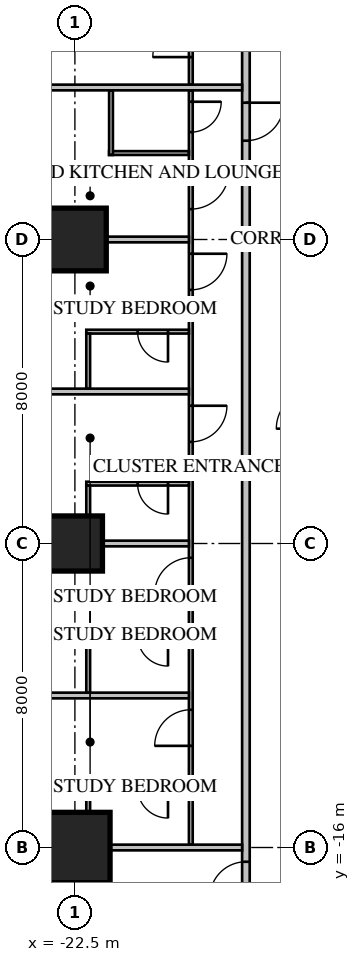
"""IFC4 building model, lengths in metres.
Left out: names, types, materials, properties, quantities, classifications, styles, units other than length and angle.
Written with IfcOpenShell. Run it as: python <this file> out.ifc"""

import sys

from ifc_helpers import new_model, si_unit, direction, frame, frame_2d, origin, origin_2d, place, context, subcontext, project, spatial, rectangle, extrude, element, fill, save


model = new_model("IFC4")
c1 = context("Model", 3, precision=1e-05, world=origin(), true_north=direction((0.0, 1.0)))
c2 = subcontext(c1, "Body", "Model", "MODEL_VIEW")
j1 = project(units=[si_unit("LENGTHUNIT", "METRE"), si_unit("PLANEANGLEUNIT", "RADIAN")], contexts=[c1])
p1 = place(None, origin())
s1 = spatial("IfcSite", under=j1, at=p1, CompositionType="ELEMENT")
p2 = place(p1, origin())
s2 = spatial("IfcBuilding", under=s1, at=p2, CompositionType="ELEMENT")
p3 = place(p2, frame((0.0, 0.0, 27.55)))
s3 = spatial("IfcBuildingStorey", under=s2, at=p3, CompositionType="ELEMENT", Elevation=27.55)
p4 = place(p3, frame((-22.5, 0.0, 0.0), z_axis=(0.0, 0.0, 1.0), x_axis=(1.0, 0.0, 0.0)))
e1 = element("IfcColumn", 1, at=p4, inside=s3, PredefinedType="COLUMN", context=c2, shape_type="SweptSolid", body=[
    extrude(rectangle(XDim=1.65, YDim=1.65, at=origin_2d()), origin(), (0.0, 0.0, 1.0), 3.85),
])
p5 = place(p3, frame((-22.5, -8.0, 0.0), z_axis=(0.0, 0.0, 1.0), x_axis=(1.0, 0.0, 0.0)))
e2 = element("IfcColumn", 2, at=p5, inside=s3, PredefinedType="COLUMN", context=c2, shape_type="SweptSolid", body=[
    extrude(rectangle(XDim=1.45, YDim=1.45, at=origin_2d()), origin(), (0.0, 0.0, 1.0), 3.85),
])
p6 = place(p3, frame((-22.5, -16.0, 0.0), z_axis=(0.0, 0.0, 1.0), x_axis=(1.0, 0.0, 0.0)))
e3 = element("IfcColumn", 3, at=p6, inside=s3, PredefinedType="COLUMN", context=c2, shape_type="SweptSolid", body=[
    extrude(rectangle(XDim=1.85, YDim=1.85, at=origin_2d()), origin(), (0.0, 0.0, 1.0), 3.85),
])
p7 = place(p3, frame((-18.0, 18.0, 0.0), z_axis=(0.0, 0.0, 1.0), x_axis=(0.0, -1.0, 0.0)))
e4 = element("IfcWall", 4, at=p7, inside=s3, PredefinedType="PARTITIONING", context=c2, shape_type="SweptSolid", body=[
    extrude(rectangle(XDim=36.0, YDim=0.2, at=frame_2d((18.0, 0.0))), origin(), (0.0, 0.0, 1.0), 3.65),
])
p8 = place(p7, frame((10.4, 0.0, 0.0)))
e5 = element("IfcOpeningElement", 5, at=p8, cuts=e4, PredefinedType="OPENING", context=c2, shape_type="SweptSolid", body=[
    extrude(rectangle(XDim=1.0, YDim=2.1, at=frame_2d((0.5, 1.05))), frame((0.0, 0.12, 0.0), z_axis=(0.0, -1.0, 0.0), x_axis=(1.0, 0.0, 0.0)), (0.0, 0.0, 1.0), 0.24),
])
p9 = place(p7, frame((14.4, 0.0, 0.0)))
e6 = element("IfcOpeningElement", 6, at=p9, cuts=e4, PredefinedType="OPENING", context=c2, shape_type="SweptSolid", body=[
    extrude(rectangle(XDim=1.0, YDim=2.1, at=frame_2d((0.5, 1.05))), frame((0.0, 0.12, 0.0), z_axis=(0.0, -1.0, 0.0), x_axis=(1.0, 0.0, 0.0)), (0.0, 0.0, 1.0), 0.24),
])
p10 = place(p7, frame((0.375, 0.0, 0.0)))
e7 = element("IfcOpeningElement", 7, at=p10, cuts=e4, PredefinedType="OPENING", context=c2, shape_type="SweptSolid", body=[
    extrude(rectangle(XDim=1.0, YDim=2.1, at=frame_2d((0.5, 1.05))), frame((0.0, 0.12, 0.0), z_axis=(0.0, -1.0, 0.0), x_axis=(1.0, 0.0, 0.0)), (0.0, 0.0, 1.0), 0.24),
])
p11 = place(p7, frame((34.375, 0.0, 0.0)))
e8 = element("IfcOpeningElement", 8, at=p11, cuts=e4, PredefinedType="OPENING", context=c2, shape_type="SweptSolid", body=[
    extrude(rectangle(XDim=0.95, YDim=2.1, at=frame_2d((0.475, 1.05))), frame((0.0, 0.12, 0.0), z_axis=(0.0, -1.0, 0.0), x_axis=(1.0, 0.0, 0.0)), (0.0, 0.0, 1.0), 0.24),
])
p12 = place(p3, frame((-19.45, 15.925, 0.0), z_axis=(0.0, 0.0, 1.0), x_axis=(0.0, -1.0, 0.0)))
e9 = element("IfcWall", 9, at=p12, inside=s3, PredefinedType="PARTITIONING", context=c2, shape_type="SweptSolid", body=[
    extrude(rectangle(XDim=11.85, YDim=0.1, at=frame_2d((5.925, 0.0))), origin(), (0.0, 0.0, 1.0), 3.65),
])
p13 = place(p12, frame((10.125, 0.0, 0.0)))
e10 = element("IfcOpeningElement", 10, at=p13, cuts=e9, PredefinedType="OPENING", context=c2, shape_type="SweptSolid", body=[
    extrude(rectangle(XDim=1.0, YDim=2.1, at=frame_2d((0.5, 1.05))), frame((0.0, 0.07, 0.0), z_axis=(0.0, -1.0, 0.0), x_axis=(1.0, 0.0, 0.0)), (0.0, 0.0, 1.0), 0.14),
])
p14 = place(p12, frame((8.3, 0.0, 0.0)))
e11 = element("IfcOpeningElement", 11, at=p14, cuts=e9, PredefinedType="OPENING", context=c2, shape_type="SweptSolid", body=[
    extrude(rectangle(XDim=0.8, YDim=2.1, at=frame_2d((0.4, 1.05))), frame((0.0, 0.07, 0.0), z_axis=(0.0, -1.0, 0.0), x_axis=(1.0, 0.0, 0.0)), (0.0, 0.0, 1.0), 0.14),
])
p15 = place(p12, frame((0.3, 0.0, 0.0)))
e12 = element("IfcOpeningElement", 12, at=p15, cuts=e9, PredefinedType="OPENING", context=c2, shape_type="SweptSolid", body=[
    extrude(rectangle(XDim=0.95, YDim=2.1, at=frame_2d((0.475, 1.05))), frame((0.0, 0.07, 0.0), z_axis=(0.0, -1.0, 0.0), x_axis=(1.0, 0.0, 0.0)), (0.0, 0.0, 1.0), 0.14),
])
p16 = place(p12, frame((4.3, 0.0, 0.0)))
e13 = element("IfcOpeningElement", 13, at=p16, cuts=e9, PredefinedType="OPENING", context=c2, shape_type="SweptSolid", body=[
    extrude(rectangle(XDim=0.95, YDim=2.1, at=frame_2d((0.475, 1.05))), frame((0.0, 0.07, 0.0), z_axis=(0.0, -1.0, 0.0), x_axis=(1.0, 0.0, 0.0)), (0.0, 0.0, 1.0), 0.14),
])
p17 = place(p3, frame((-19.45, 3.925, 0.0), z_axis=(0.0, 0.0, 1.0), x_axis=(0.0, -1.0, 0.0)))
e14 = element("IfcWall", 14, at=p17, inside=s3, PredefinedType="PARTITIONING", context=c2, shape_type="SweptSolid", body=[
    extrude(rectangle(XDim=19.85, YDim=0.1, at=frame_2d((9.925, 0.0))), origin(), (0.0, 0.0, 1.0), 3.65),
])
p18 = place(p17, frame((2.125, 0.0, 0.0)))
e15 = element("IfcOpeningElement", 15, at=p18, cuts=e14, PredefinedType="OPENING", context=c2, shape_type="SweptSolid", body=[
    extrude(rectangle(XDim=1.0, YDim=2.1, at=frame_2d((0.5, 1.05))), frame((0.0, 0.07, 0.0), z_axis=(0.0, -1.0, 0.0), x_axis=(1.0, 0.0, 0.0)), (0.0, 0.0, 1.0), 0.14),
])
p19 = place(p17, frame((0.3, 0.0, 0.0)))
e16 = element("IfcOpeningElement", 16, at=p19, cuts=e14, PredefinedType="OPENING", context=c2, shape_type="SweptSolid", body=[
    extrude(rectangle(XDim=0.8, YDim=2.1, at=frame_2d((0.4, 1.05))), frame((0.0, 0.07, 0.0), z_axis=(0.0, -1.0, 0.0), x_axis=(1.0, 0.0, 0.0)), (0.0, 0.0, 1.0), 0.14),
])
p20 = place(p17, frame((4.3, 0.0, 0.0)))
e17 = element("IfcOpeningElement", 17, at=p20, cuts=e14, PredefinedType="OPENING", context=c2, shape_type="SweptSolid", body=[
    extrude(rectangle(XDim=0.95, YDim=2.1, at=frame_2d((0.475, 1.05))), frame((0.0, 0.07, 0.0), z_axis=(0.0, -1.0, 0.0), x_axis=(1.0, 0.0, 0.0)), (0.0, 0.0, 1.0), 0.14),
])
p21 = place(p17, frame((8.3, 0.0, 0.0)))
e18 = element("IfcOpeningElement", 18, at=p21, cuts=e14, PredefinedType="OPENING", context=c2, shape_type="SweptSolid", body=[
    extrude(rectangle(XDim=0.95, YDim=2.1, at=frame_2d((0.475, 1.05))), frame((0.0, 0.07, 0.0), z_axis=(0.0, -1.0, 0.0), x_axis=(1.0, 0.0, 0.0)), (0.0, 0.0, 1.0), 0.14),
])
p22 = place(p17, frame((12.3, 0.0, 0.0)))
e19 = element("IfcOpeningElement", 19, at=p22, cuts=e14, PredefinedType="OPENING", context=c2, shape_type="SweptSolid", body=[
    extrude(rectangle(XDim=0.95, YDim=2.1, at=frame_2d((0.475, 1.05))), frame((0.0, 0.07, 0.0), z_axis=(0.0, -1.0, 0.0), x_axis=(1.0, 0.0, 0.0)), (0.0, 0.0, 1.0), 0.14),
])
p23 = place(p17, frame((16.3, 0.0, 0.0)))
e20 = element("IfcOpeningElement", 20, at=p23, cuts=e14, PredefinedType="OPENING", context=c2, shape_type="SweptSolid", body=[
    extrude(rectangle(XDim=0.95, YDim=2.1, at=frame_2d((0.475, 1.05))), frame((0.0, 0.07, 0.0), z_axis=(0.0, -1.0, 0.0), x_axis=(1.0, 0.0, 0.0)), (0.0, 0.0, 1.0), 0.14),
])
p24 = place(p3, frame((-19.5, 2.275, 0.0), z_axis=(0.0, 0.0, 1.0), x_axis=(-1.0, 0.0, 0.0)))
e21 = element("IfcWall", 21, at=p24, inside=s3, PredefinedType="PARTITIONING", context=c2, shape_type="SweptSolid", body=[
    extrude(rectangle(XDim=2.1, YDim=0.1, at=frame_2d((1.05, 0.0))), origin(), (0.0, 0.0, 1.0), 3.65),
])
p25 = place(p3, frame((-21.55, 3.925, 0.0), z_axis=(0.0, 0.0, 1.0), x_axis=(0.0, -1.0, 0.0)))
e22 = element("IfcWall", 22, at=p25, inside=s3, PredefinedType="PARTITIONING", context=c2, shape_type="SweptSolid", body=[
    extrude(rectangle(XDim=1.7, YDim=0.1, at=frame_2d((0.85, 0.0))), origin(), (0.0, 0.0, 1.0), 3.65),
])
p26 = place(p3, frame((-18.1, 4.0, 0.0), z_axis=(0.0, 0.0, 1.0), x_axis=(-1.0, 0.0, 0.0)))
e23 = element("IfcWall", 23, at=p26, inside=s3, PredefinedType="PARTITIONING", context=c2, shape_type="SweptSolid", body=[
    extrude(rectangle(XDim=6.6, YDim=0.15, at=frame_2d((3.3, 0.0))), origin(), (0.0, 0.0, 1.0), 3.65),
])
p27 = place(p3, frame((-19.5, 0.0, 0.0), z_axis=(0.0, 0.0, 1.0), x_axis=(-1.0, 0.0, 0.0)))
e24 = element("IfcWall", 24, at=p27, inside=s3, PredefinedType="PARTITIONING", context=c2, shape_type="SweptSolid", body=[
    extrude(rectangle(XDim=5.2, YDim=0.15, at=frame_2d((2.6, 0.0))), origin(), (0.0, 0.0, 1.0), 2.957),
])
for number, where, z_axis, x_axis in (
    (25, (-19.5, -4.0, 0.0), (0.0, 0.0, 1.0), (-1.0, 0.0, 0.0)),
    (26, (-19.5, -8.0, 0.0), (0.0, 0.0, 1.0), (-1.0, 0.0, 0.0)),
    (27, (-19.5, -12.0, 0.0), (0.0, 0.0, 1.0), (-1.0, 0.0, 0.0)),
):
    element("IfcWall", number, at=place(p3, frame(where, z_axis=z_axis, x_axis=x_axis)), inside=s3, PredefinedType="PARTITIONING", context=c2, shape_type="SweptSolid", body=[
        extrude(rectangle(XDim=5.2, YDim=0.15, at=frame_2d((2.6, 0.0))), origin(), (0.0, 0.0, 1.0), 3.65),
    ])
p28 = place(p3, frame((-18.1, -16.0, 0.0), z_axis=(0.0, 0.0, 1.0), x_axis=(-1.0, 0.0, 0.0)))
e28 = element("IfcWall", 28, at=p28, inside=s3, PredefinedType="PARTITIONING", context=c2, shape_type="SweptSolid", body=[
    extrude(rectangle(XDim=6.589, YDim=0.15, at=frame_2d((3.295, 0.0))), origin(), (0.0, 0.0, 1.0), 3.65),
])
p29 = place(p3, frame((-19.5, -2.425, 0.0), z_axis=(0.0, 0.0, 1.0), x_axis=(-1.0, 0.0, 0.0)))
e29 = element("IfcWall", 29, at=p29, inside=s3, PredefinedType="PARTITIONING", context=c2, shape_type="SweptSolid", body=[
    extrude(rectangle(XDim=2.7, YDim=0.1, at=frame_2d((1.35, 0.0))), origin(), (0.0, 0.0, 1.0), 3.65),
])
p30 = place(p29, frame((0.55, 0.0, 0.0)))
e30 = element("IfcOpeningElement", 30, at=p30, cuts=e29, PredefinedType="OPENING", context=c2, shape_type="SweptSolid", body=[
    extrude(rectangle(XDim=0.8, YDim=2.1, at=frame_2d((0.4, 1.05))), frame((0.0, 0.07, 0.0), z_axis=(0.0, -1.0, 0.0), x_axis=(1.0, 0.0, 0.0)), (0.0, 0.0, 1.0), 0.14),
])
p31 = place(p3, frame((-22.15, -2.475, 0.0), z_axis=(0.0, 0.0, 1.0), x_axis=(0.0, -1.0, 0.0)))
e31 = element("IfcWall", 31, at=p31, inside=s3, PredefinedType="PARTITIONING", context=c2, shape_type="SweptSolid", body=[
    extrude(rectangle(XDim=1.45, YDim=0.1, at=frame_2d((0.725, 0.0))), origin(), (0.0, 0.0, 1.0), 3.65),
])
p32 = place(p3, frame((-19.5, -6.425, 0.0), z_axis=(0.0, 0.0, 1.0), x_axis=(-1.0, 0.0, 0.0)))
e32 = element("IfcWall", 32, at=p32, inside=s3, PredefinedType="PARTITIONING", context=c2, shape_type="SweptSolid", body=[
    extrude(rectangle(XDim=2.7, YDim=0.1, at=frame_2d((1.35, 0.0))), origin(), (0.0, 0.0, 1.0), 3.65),
])
p33 = place(p32, frame((0.55, 0.0, 0.0)))
e33 = element("IfcOpeningElement", 33, at=p33, cuts=e32, PredefinedType="OPENING", context=c2, shape_type="SweptSolid", body=[
    extrude(rectangle(XDim=0.8, YDim=2.1, at=frame_2d((0.4, 1.05))), frame((0.0, 0.07, 0.0), z_axis=(0.0, -1.0, 0.0), x_axis=(1.0, 0.0, 0.0)), (0.0, 0.0, 1.0), 0.14),
])
p34 = place(p3, frame((-22.15, -6.475, 0.0), z_axis=(0.0, 0.0, 1.0), x_axis=(0.0, -1.0, 0.0)))
e34 = element("IfcWall", 34, at=p34, inside=s3, PredefinedType="PARTITIONING", context=c2, shape_type="SweptSolid", body=[
    extrude(rectangle(XDim=1.45, YDim=0.1, at=frame_2d((0.725, 0.0))), origin(), (0.0, 0.0, 1.0), 3.65),
])
p35 = place(p3, frame((-19.5, -10.425, 0.0), z_axis=(0.0, 0.0, 1.0), x_axis=(-1.0, 0.0, 0.0)))
e35 = element("IfcWall", 35, at=p35, inside=s3, PredefinedType="PARTITIONING", context=c2, shape_type="SweptSolid", body=[
    extrude(rectangle(XDim=2.7, YDim=0.1, at=frame_2d((1.35, 0.0))), origin(), (0.0, 0.0, 1.0), 3.65),
])
p36 = place(p35, frame((0.55, 0.0, 0.0)))
e36 = element("IfcOpeningElement", 36, at=p36, cuts=e35, PredefinedType="OPENING", context=c2, shape_type="SweptSolid", body=[
    extrude(rectangle(XDim=0.8, YDim=2.1, at=frame_2d((0.4, 1.05))), frame((0.0, 0.07, 0.0), z_axis=(0.0, -1.0, 0.0), x_axis=(1.0, 0.0, 0.0)), (0.0, 0.0, 1.0), 0.14),
])
p37 = place(p3, frame((-22.15, -10.475, 0.0), z_axis=(0.0, 0.0, 1.0), x_axis=(0.0, -1.0, 0.0)))
e37 = element("IfcWall", 37, at=p37, inside=s3, PredefinedType="PARTITIONING", context=c2, shape_type="SweptSolid", body=[
    extrude(rectangle(XDim=1.45, YDim=0.1, at=frame_2d((0.725, 0.0))), origin(), (0.0, 0.0, 1.0), 3.65),
])
p38 = place(p3, frame((-19.5, -14.425, 0.0), z_axis=(0.0, 0.0, 1.0), x_axis=(-1.0, 0.0, 0.0)))
e38 = element("IfcWall", 38, at=p38, inside=s3, PredefinedType="PARTITIONING", context=c2, shape_type="SweptSolid", body=[
    extrude(rectangle(XDim=2.7, YDim=0.1, at=frame_2d((1.35, 0.0))), origin(), (0.0, 0.0, 1.0), 3.65),
])
p39 = place(p38, frame((0.55, 0.0, 0.0)))
e39 = element("IfcOpeningElement", 39, at=p39, cuts=e38, PredefinedType="OPENING", context=c2, shape_type="SweptSolid", body=[
    extrude(rectangle(XDim=0.8, YDim=2.1, at=frame_2d((0.4, 1.05))), frame((0.0, 0.07, 0.0), z_axis=(0.0, -1.0, 0.0), x_axis=(1.0, 0.0, 0.0)), (0.0, 0.0, 1.0), 0.14),
])
p40 = place(p3, frame((-22.15, -14.475, 0.0), z_axis=(0.0, 0.0, 1.0), x_axis=(0.0, -1.0, 0.0)))
e40 = element("IfcWall", 40, at=p40, inside=s3, PredefinedType="PARTITIONING", context=c2, shape_type="SweptSolid", body=[
    extrude(rectangle(XDim=1.45, YDim=0.1, at=frame_2d((0.725, 0.0))), origin(), (0.0, 0.0, 1.0), 3.65),
])
p41 = place(p13, origin())
e41 = element("IfcDoor", 41, at=p41, inside=s3, OperationType="SINGLE_SWING_RIGHT", PredefinedType="DOOR", context=c2, shape_type="SweptSolid", body=[
    extrude(rectangle(XDim=1.0, YDim=2.1, at=frame_2d((0.5, 1.05))), frame((0.0, 0.025, 0.0), z_axis=(0.0, -1.0, 0.0), x_axis=(1.0, 0.0, 0.0)), (0.0, 0.0, 1.0), 0.05),
])
fill(e10, e41)
p42 = place(p9, origin())
e42 = element("IfcDoor", 42, at=p42, inside=s3, OperationType="SINGLE_SWING_LEFT", PredefinedType="DOOR", context=c2, shape_type="SweptSolid", body=[
    extrude(rectangle(XDim=1.0, YDim=2.1, at=frame_2d((0.5, 1.05))), frame((0.0, 0.025, 0.0), z_axis=(0.0, -1.0, 0.0), x_axis=(1.0, 0.0, 0.0)), (0.0, 0.0, 1.0), 0.05),
])
fill(e6, e42)
p43 = place(p18, origin())
e43 = element("IfcDoor", 43, at=p43, inside=s3, OperationType="SINGLE_SWING_LEFT", PredefinedType="DOOR", context=c2, shape_type="SweptSolid", body=[
    extrude(rectangle(XDim=1.0, YDim=2.1, at=frame_2d((0.5, 1.05))), frame((0.0, 0.025, 0.0), z_axis=(0.0, -1.0, 0.0), x_axis=(1.0, 0.0, 0.0)), (0.0, 0.0, 1.0), 0.05),
])
fill(e15, e43)
p44 = place(p19, origin())
e44 = element("IfcDoor", 44, at=p44, inside=s3, OperationType="SINGLE_SWING_LEFT", PredefinedType="DOOR", context=c2, shape_type="SweptSolid", body=[
    extrude(rectangle(XDim=0.8, YDim=2.1, at=frame_2d((0.4, 1.05))), frame((0.0, 0.025, 0.0), z_axis=(0.0, -1.0, 0.0), x_axis=(1.0, 0.0, 0.0)), (0.0, 0.0, 1.0), 0.05),
])
fill(e16, e44)
p45 = place(p20, origin())
e45 = element("IfcDoor", 45, at=p45, inside=s3, OperationType="SINGLE_SWING_LEFT", PredefinedType="DOOR", context=c2, shape_type="SweptSolid", body=[
    extrude(rectangle(XDim=0.95, YDim=2.1, at=frame_2d((0.475, 1.05))), frame((0.0, 0.025, 0.0), z_axis=(0.0, -1.0, 0.0), x_axis=(1.0, 0.0, 0.0)), (0.0, 0.0, 1.0), 0.05),
])
fill(e17, e45)
p46 = place(p30, origin())
e46 = element("IfcDoor", 46, at=p46, inside=s3, OperationType="SINGLE_SWING_LEFT", PredefinedType="DOOR", context=c2, shape_type="SweptSolid", body=[
    extrude(rectangle(XDim=0.8, YDim=2.1, at=frame_2d((0.4, 1.05))), frame((0.0, 0.025, 0.0), z_axis=(0.0, -1.0, 0.0), x_axis=(1.0, 0.0, 0.0)), (0.0, 0.0, 1.0), 0.05),
])
fill(e30, e46)
p47 = place(p21, origin())
e47 = element("IfcDoor", 47, at=p47, inside=s3, OperationType="SINGLE_SWING_LEFT", PredefinedType="DOOR", context=c2, shape_type="SweptSolid", body=[
    extrude(rectangle(XDim=0.95, YDim=2.1, at=frame_2d((0.475, 1.05))), frame((0.0, 0.025, 0.0), z_axis=(0.0, -1.0, 0.0), x_axis=(1.0, 0.0, 0.0)), (0.0, 0.0, 1.0), 0.05),
])
fill(e18, e47)
p48 = place(p33, origin())
e48 = element("IfcDoor", 48, at=p48, inside=s3, OperationType="SINGLE_SWING_LEFT", PredefinedType="DOOR", context=c2, shape_type="SweptSolid", body=[
    extrude(rectangle(XDim=0.8, YDim=2.1, at=frame_2d((0.4, 1.05))), frame((0.0, 0.025, 0.0), z_axis=(0.0, -1.0, 0.0), x_axis=(1.0, 0.0, 0.0)), (0.0, 0.0, 1.0), 0.05),
])
fill(e33, e48)
p49 = place(p22, origin())
e49 = element("IfcDoor", 49, at=p49, inside=s3, OperationType="SINGLE_SWING_RIGHT", PredefinedType="DOOR", context=c2, shape_type="SweptSolid", body=[
    extrude(rectangle(XDim=0.95, YDim=2.1, at=frame_2d((0.475, 1.05))), frame((0.0, 0.025, 0.0), z_axis=(0.0, -1.0, 0.0), x_axis=(1.0, 0.0, 0.0)), (0.0, 0.0, 1.0), 0.05),
])
fill(e19, e49)
p50 = place(p36, origin())
e50 = element("IfcDoor", 50, at=p50, inside=s3, OperationType="SINGLE_SWING_LEFT", PredefinedType="DOOR", context=c2, shape_type="SweptSolid", body=[
    extrude(rectangle(XDim=0.8, YDim=2.1, at=frame_2d((0.4, 1.05))), frame((0.0, 0.025, 0.0), z_axis=(0.0, -1.0, 0.0), x_axis=(1.0, 0.0, 0.0)), (0.0, 0.0, 1.0), 0.05),
])
fill(e36, e50)
p51 = place(p23, origin())
e51 = element("IfcDoor", 51, at=p51, inside=s3, OperationType="SINGLE_SWING_RIGHT", PredefinedType="DOOR", context=c2, shape_type="SweptSolid", body=[
    extrude(rectangle(XDim=0.95, YDim=2.1, at=frame_2d((0.475, 1.05))), frame((0.0, 0.025, 0.0), z_axis=(0.0, -1.0, 0.0), x_axis=(1.0, 0.0, 0.0)), (0.0, 0.0, 1.0), 0.05),
])
fill(e20, e51)
p52 = place(p39, origin())
e52 = element("IfcDoor", 52, at=p52, inside=s3, OperationType="SINGLE_SWING_LEFT", PredefinedType="DOOR", context=c2, shape_type="SweptSolid", body=[
    extrude(rectangle(XDim=0.8, YDim=2.1, at=frame_2d((0.4, 1.05))), frame((0.0, 0.025, 0.0), z_axis=(0.0, -1.0, 0.0), x_axis=(1.0, 0.0, 0.0)), (0.0, 0.0, 1.0), 0.05),
])
fill(e39, e52)
p53 = place(p11, origin())
e53 = element("IfcDoor", 53, at=p53, inside=s3, OperationType="SINGLE_SWING_RIGHT", PredefinedType="DOOR", context=c2, shape_type="SweptSolid", body=[
    extrude(rectangle(XDim=0.95, YDim=2.1, at=frame_2d((0.475, 1.05))), frame((0.0, 0.025, 0.0), z_axis=(0.0, -1.0, 0.0), x_axis=(1.0, 0.0, 0.0)), (0.0, 0.0, 1.0), 0.05),
])
fill(e8, e53)
save(model, sys.argv[1])
